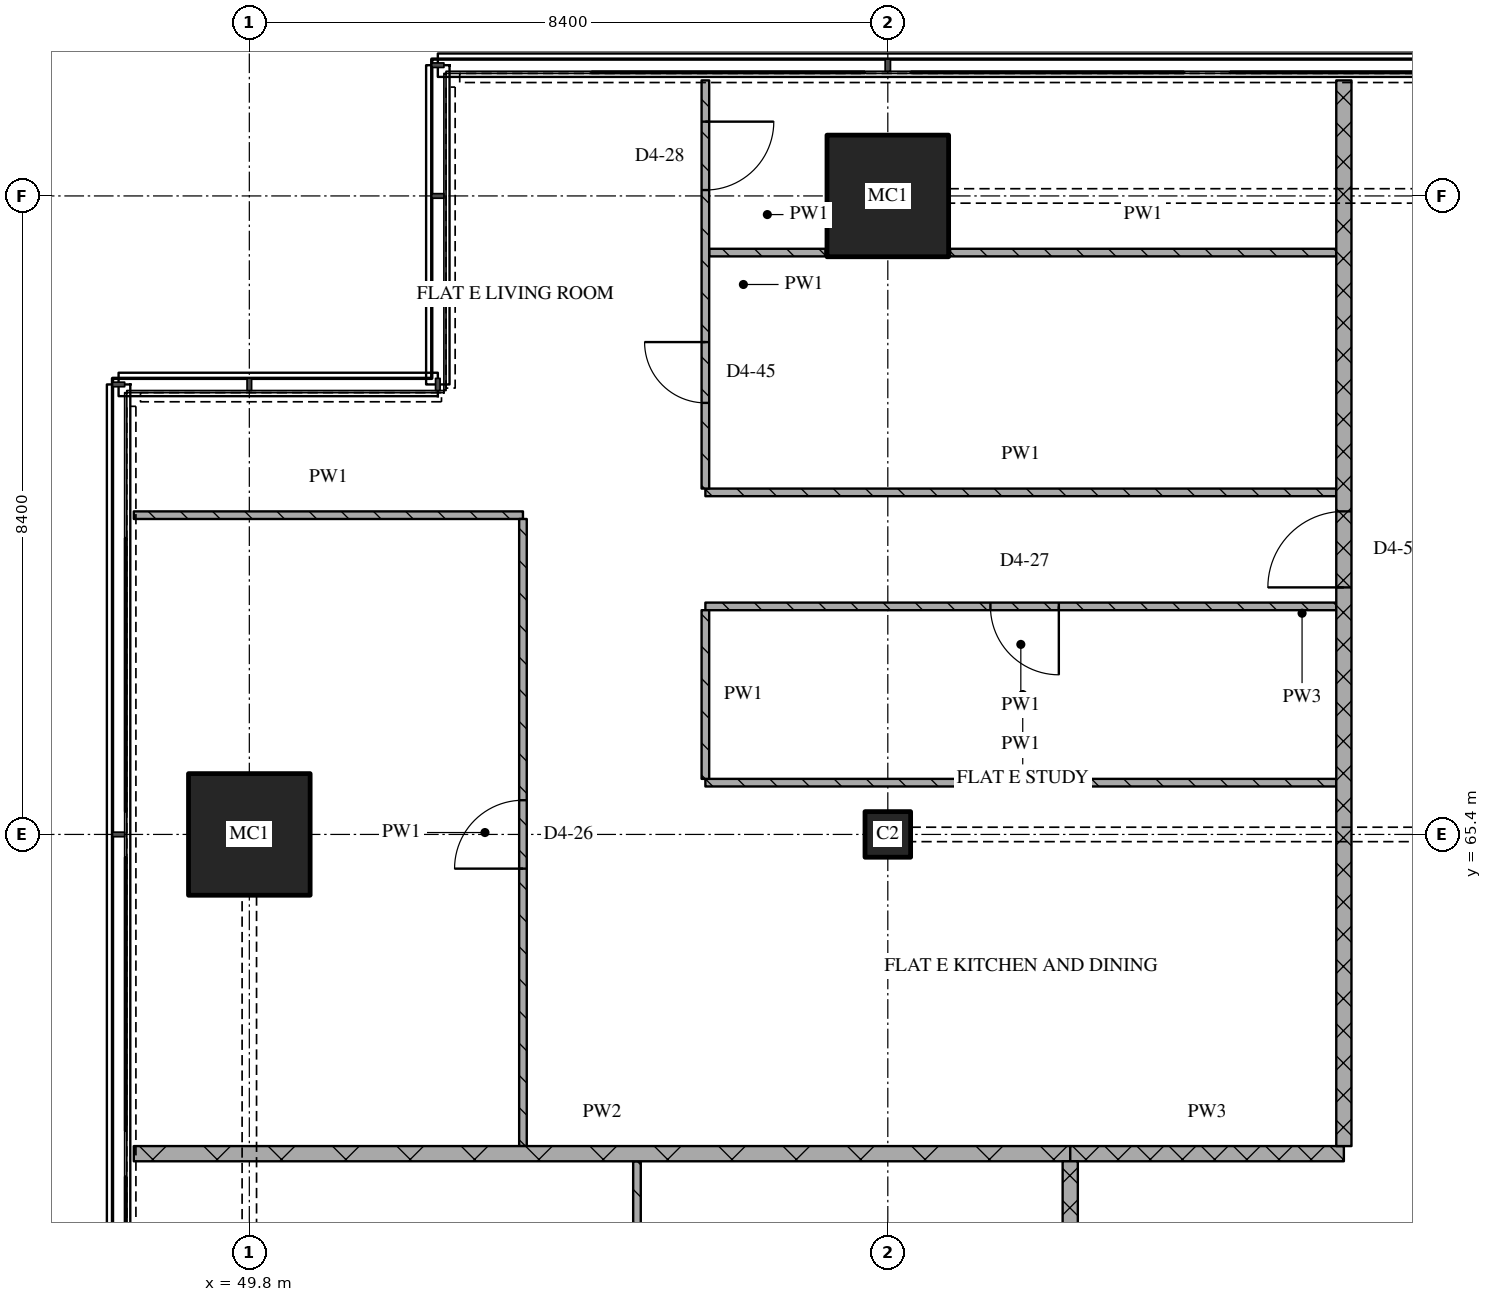
"""IFC4 building model, lengths in metres.
Left out: names, types, materials, properties, quantities, classifications, styles, units other than length and angle.
Written with IfcOpenShell. Run it as: python <this file> out.ifc"""

import sys

from ifc_helpers import new_model, si_unit, direction, frame, frame_2d, origin, origin_2d, place, context, subcontext, project, spatial, rectangle, extrude, element, fill, save


model = new_model("IFC4")
c1 = context("Model", 3, precision=1e-05, world=origin(), true_north=direction((0.0, 1.0)))
c2 = subcontext(c1, "Body", "Model", "MODEL_VIEW")
j1 = project(units=[si_unit("LENGTHUNIT", "METRE"), si_unit("PLANEANGLEUNIT", "RADIAN")], contexts=[c1])
p1 = place(None, origin())
s1 = spatial("IfcSite", under=j1, at=p1, CompositionType="ELEMENT")
p2 = place(p1, origin())
s2 = spatial("IfcBuilding", under=s1, at=p2, CompositionType="ELEMENT")
p3 = place(p2, frame((0.0, 0.0, 241.5)))
s3 = spatial("IfcBuildingStorey", under=s2, at=p3, CompositionType="ELEMENT", Elevation=241.5)
p4 = place(p3, frame((49.8, 65.4, 0.0), z_axis=(0.0, 0.0, 1.0), x_axis=(1.0, 0.0, 0.0)))
e1 = element("IfcColumn", 1, at=p4, inside=s3, PredefinedType="COLUMN", context=c2, shape_type="SweptSolid", body=[
    extrude(rectangle(XDim=1.6, YDim=1.6, at=origin_2d()), origin(), (0.0, 0.0, 1.0), 3.6),
])
p5 = place(p3, frame((58.2, 65.4, 0.0), z_axis=(0.0, 0.0, 1.0), x_axis=(1.0, 0.0, 0.0)))
e2 = element("IfcColumn", 2, at=p5, inside=s3, PredefinedType="COLUMN", context=c2, shape_type="SweptSolid", body=[
    extrude(rectangle(XDim=0.6, YDim=0.6, at=origin_2d()), origin(), (0.0, 0.0, 1.0), 3.6),
])
p6 = place(p3, frame((58.2, 73.8, 0.0), z_axis=(0.0, 0.0, 1.0), x_axis=(1.0, 0.0, 0.0)))
e3 = element("IfcColumn", 3, at=p6, inside=s3, PredefinedType="COLUMN", context=c2, shape_type="SweptSolid", body=[
    extrude(rectangle(XDim=1.6, YDim=1.6, at=origin_2d()), origin(), (0.0, 0.0, 1.0), 3.6),
])
p7 = place(p3, frame((60.6, 61.2, 0.0), z_axis=(0.0, 0.0, 1.0), x_axis=(1.0, 0.0, 0.0)))
e4 = element("IfcWall", 4, at=p7, inside=s3, PredefinedType="PARTITIONING", context=c2, shape_type="SweptSolid", body=[
    extrude(rectangle(XDim=3.6, YDim=0.2, at=frame_2d((1.8, 0.0))), origin(), (0.0, 0.0, 1.0), 3.32),
])
p8 = place(p3, frame((48.28, 61.2, 0.0), z_axis=(0.0, 0.0, 1.0), x_axis=(1.0, 0.0, 0.0)))
e5 = element("IfcWall", 5, at=p8, inside=s3, PredefinedType="PARTITIONING", context=c2, shape_type="SweptSolid", body=[
    extrude(rectangle(XDim=12.32, YDim=0.2, at=frame_2d((6.16, 0.0))), origin(), (0.0, 0.0, 1.0), 3.32),
])
p9 = place(p3, frame((55.8, 66.081, 0.0), z_axis=(0.0, 0.0, 1.0), x_axis=(1.0, 0.0, 0.0)))
e6 = element("IfcWall", 6, at=p9, inside=s3, PredefinedType="PARTITIONING", context=c2, shape_type="SweptSolid", body=[
    extrude(rectangle(XDim=8.3, YDim=0.1, at=frame_2d((4.15, 0.0))), origin(), (0.0, 0.0, 1.0), 3.32),
])
p10 = place(p3, frame((64.1, 68.4, 0.0), z_axis=(0.0, 0.0, 1.0), x_axis=(-1.0, 0.0, 0.0)))
e7 = element("IfcWall", 7, at=p10, inside=s3, PredefinedType="PARTITIONING", context=c2, shape_type="SweptSolid", body=[
    extrude(rectangle(XDim=8.3, YDim=0.1, at=frame_2d((4.15, 0.0))), origin(), (0.0, 0.0, 1.0), 3.32),
])
p11 = place(p10, frame((3.65, 0.0, 0.0)))
e8 = element("IfcOpeningElement", 8, at=p11, cuts=e7, PredefinedType="OPENING", context=c2, shape_type="SweptSolid", body=[
    extrude(rectangle(XDim=0.9, YDim=2.1, at=frame_2d((0.45, 1.05))), frame((0.0, 0.06, 0.0), z_axis=(0.0, -1.0, 0.0), x_axis=(1.0, 0.0, 0.0)), (0.0, 0.0, 1.0), 0.12),
])
p12 = place(p3, frame((48.28, 69.6, 0.0), z_axis=(0.0, 0.0, 1.0), x_axis=(1.0, 0.0, 0.0)))
e9 = element("IfcWall", 9, at=p12, inside=s3, PredefinedType="PARTITIONING", context=c2, shape_type="SweptSolid", body=[
    extrude(rectangle(XDim=5.12, YDim=0.1, at=frame_2d((2.56, 0.0))), origin(), (0.0, 0.0, 1.0), 3.32),
])
p13 = place(p3, frame((55.8, 69.9, 0.0), z_axis=(0.0, 0.0, 1.0), x_axis=(1.0, 0.0, 0.0)))
e10 = element("IfcWall", 10, at=p13, inside=s3, PredefinedType="PARTITIONING", context=c2, shape_type="SweptSolid", body=[
    extrude(rectangle(XDim=8.3, YDim=0.1, at=frame_2d((4.15, 0.0))), origin(), (0.0, 0.0, 1.0), 3.32),
])
p14 = place(p3, frame((55.85, 73.055, 0.0), z_axis=(0.0, 0.0, 1.0), x_axis=(1.0, 0.0, 0.0)))
e11 = element("IfcWall", 11, at=p14, inside=s3, PredefinedType="PARTITIONING", context=c2, shape_type="SweptSolid", body=[
    extrude(rectangle(XDim=1.53, YDim=0.1, at=frame_2d((0.765, 0.0))), origin(), (0.0, 0.0, 1.0), 3.32),
])
p15 = place(p3, frame((59.02, 73.055, 0.0), z_axis=(0.0, 0.0, 1.0), x_axis=(1.0, 0.0, 0.0)))
e12 = element("IfcWall", 12, at=p15, inside=s3, PredefinedType="PARTITIONING", context=c2, shape_type="SweptSolid", body=[
    extrude(rectangle(XDim=5.08, YDim=0.1, at=frame_2d((2.54, 0.0))), origin(), (0.0, 0.0, 1.0), 3.32),
])
p16 = place(p3, frame((53.4, 61.3, 0.0), z_axis=(0.0, 0.0, 1.0), x_axis=(0.0, 1.0, 0.0)))
e13 = element("IfcWall", 13, at=p16, inside=s3, PredefinedType="PARTITIONING", context=c2, shape_type="SweptSolid", body=[
    extrude(rectangle(XDim=8.25, YDim=0.1, at=frame_2d((4.125, 0.0))), origin(), (0.0, 0.0, 1.0), 3.32),
])
p17 = place(p16, frame((3.65, 0.0, 0.0)))
e14 = element("IfcOpeningElement", 14, at=p17, cuts=e13, PredefinedType="OPENING", context=c2, shape_type="SweptSolid", body=[
    extrude(rectangle(XDim=0.9, YDim=2.1, at=frame_2d((0.45, 1.05))), frame((0.0, 0.06, 0.0), z_axis=(0.0, -1.0, 0.0), x_axis=(1.0, 0.0, 0.0)), (0.0, 0.0, 1.0), 0.12),
])
p18 = place(p3, frame((54.9, 61.1, 0.0), z_axis=(0.0, 0.0, 1.0), x_axis=(0.0, -1.0, 0.0)))
e15 = element("IfcWall", 15, at=p18, inside=s3, PredefinedType="PARTITIONING", context=c2, shape_type="SweptSolid", body=[
    extrude(rectangle(XDim=7.65, YDim=0.1, at=frame_2d((3.825, 0.0))), origin(), (0.0, 0.0, 1.0), 3.32),
])
p19 = place(p18, frame((1.15, 0.0, 0.0)))
e16 = element("IfcOpeningElement", 16, at=p19, cuts=e15, PredefinedType="OPENING", context=c2, shape_type="SweptSolid", body=[
    extrude(rectangle(XDim=0.8, YDim=2.1, at=frame_2d((0.4, 1.05))), frame((0.0, 0.06, 0.0), z_axis=(0.0, -1.0, 0.0), x_axis=(1.0, 0.0, 0.0)), (0.0, 0.0, 1.0), 0.12),
])
p20 = place(p18, frame((5.05, 0.0, 0.0)))
e17 = element("IfcOpeningElement", 17, at=p20, cuts=e15, PredefinedType="OPENING", context=c2, shape_type="SweptSolid", body=[
    extrude(rectangle(XDim=0.8, YDim=2.1, at=frame_2d((0.4, 1.05))), frame((0.0, 0.06, 0.0), z_axis=(0.0, -1.0, 0.0), x_axis=(1.0, 0.0, 0.0)), (0.0, 0.0, 1.0), 0.12),
])
p21 = place(p3, frame((55.8, 68.35, 0.0), z_axis=(0.0, 0.0, 1.0), x_axis=(0.0, -1.0, 0.0)))
e18 = element("IfcWall", 18, at=p21, inside=s3, PredefinedType="PARTITIONING", context=c2, shape_type="SweptSolid", body=[
    extrude(rectangle(XDim=2.219, YDim=0.1, at=frame_2d((1.109, 0.0))), origin(), (0.0, 0.0, 1.0), 3.32),
])
p22 = place(p3, frame((55.8, 75.32, 0.0), z_axis=(0.0, 0.0, 1.0), x_axis=(0.0, -1.0, 0.0)))
e19 = element("IfcWall", 19, at=p22, inside=s3, PredefinedType="PARTITIONING", context=c2, shape_type="SweptSolid", body=[
    extrude(rectangle(XDim=5.37, YDim=0.1, at=frame_2d((2.685, 0.0))), origin(), (0.0, 0.0, 1.0), 3.32),
])
p23 = place(p22, frame((0.542, 0.0, 0.0)))
e20 = element("IfcOpeningElement", 20, at=p23, cuts=e19, PredefinedType="OPENING", context=c2, shape_type="SweptSolid", body=[
    extrude(rectangle(XDim=0.9, YDim=2.1, at=frame_2d((0.45, 1.05))), frame((0.0, 0.06, 0.0), z_axis=(0.0, -1.0, 0.0), x_axis=(1.0, 0.0, 0.0)), (0.0, 0.0, 1.0), 0.12),
])
p24 = place(p22, frame((3.443, 0.0, 0.0)))
e21 = element("IfcOpeningElement", 21, at=p24, cuts=e19, PredefinedType="OPENING", context=c2, shape_type="SweptSolid", body=[
    extrude(rectangle(XDim=0.8, YDim=2.1, at=frame_2d((0.4, 1.05))), frame((0.0, 0.06, 0.0), z_axis=(0.0, -1.0, 0.0), x_axis=(1.0, 0.0, 0.0)), (0.0, 0.0, 1.0), 0.12),
])
p25 = place(p3, frame((60.6, 43.3, 0.0), z_axis=(0.0, 0.0, 1.0), x_axis=(0.0, 1.0, 0.0)))
e22 = element("IfcWall", 22, at=p25, inside=s3, PredefinedType="PARTITIONING", context=c2, shape_type="SweptSolid", body=[
    extrude(rectangle(XDim=17.8, YDim=0.2, at=frame_2d((8.9, 0.0))), origin(), (0.0, 0.0, 1.0), 3.32),
])
p26 = place(p25, frame((8.85, 0.0, 0.0)))
e23 = element("IfcOpeningElement", 23, at=p26, cuts=e22, PredefinedType="OPENING", context=c2, shape_type="SweptSolid", body=[
    extrude(rectangle(XDim=1.0, YDim=2.1, at=frame_2d((0.5, 1.05))), frame((0.0, 0.11, 0.0), z_axis=(0.0, -1.0, 0.0), x_axis=(1.0, 0.0, 0.0)), (0.0, 0.0, 1.0), 0.22),
])
p27 = place(p3, frame((64.2, 61.3, 0.0), z_axis=(0.0, 0.0, 1.0), x_axis=(0.0, 1.0, 0.0)))
e24 = element("IfcWall", 24, at=p27, inside=s3, PredefinedType="PARTITIONING", context=c2, shape_type="SweptSolid", body=[
    extrude(rectangle(XDim=14.02, YDim=0.2, at=frame_2d((7.01, 0.0))), origin(), (0.0, 0.0, 1.0), 3.32),
])
p28 = place(p27, frame((7.35, 0.0, 0.0)))
e25 = element("IfcOpeningElement", 25, at=p28, cuts=e24, PredefinedType="OPENING", context=c2, shape_type="SweptSolid", body=[
    extrude(rectangle(XDim=1.0, YDim=2.1, at=frame_2d((0.5, 1.05))), frame((0.0, 0.11, 0.0), z_axis=(0.0, -1.0, 0.0), x_axis=(1.0, 0.0, 0.0)), (0.0, 0.0, 1.0), 0.22),
])
p29 = place(p11, origin())
e26 = element("IfcDoor", 26, at=p29, inside=s3, OperationType="SINGLE_SWING_LEFT", PredefinedType="DOOR", context=c2, shape_type="SweptSolid", body=[
    extrude(rectangle(XDim=0.9, YDim=2.1, at=frame_2d((0.45, 1.05))), frame((0.0, 0.025, 0.0), z_axis=(0.0, -1.0, 0.0), x_axis=(1.0, 0.0, 0.0)), (0.0, 0.0, 1.0), 0.05),
])
fill(e8, e26)
p30 = place(p17, origin())
e27 = element("IfcDoor", 27, at=p30, inside=s3, OperationType="SINGLE_SWING_LEFT", PredefinedType="DOOR", context=c2, shape_type="SweptSolid", body=[
    extrude(rectangle(XDim=0.9, YDim=2.1, at=frame_2d((0.45, 1.05))), frame((0.0, 0.025, 0.0), z_axis=(0.0, -1.0, 0.0), x_axis=(1.0, 0.0, 0.0)), (0.0, 0.0, 1.0), 0.05),
])
fill(e14, e27)
p31 = place(p23, origin())
e28 = element("IfcDoor", 28, at=p31, inside=s3, OperationType="SINGLE_SWING_LEFT", PredefinedType="DOOR", context=c2, shape_type="SweptSolid", body=[
    extrude(rectangle(XDim=0.9, YDim=2.1, at=frame_2d((0.45, 1.05))), frame((0.0, 0.025, 0.0), z_axis=(0.0, -1.0, 0.0), x_axis=(1.0, 0.0, 0.0)), (0.0, 0.0, 1.0), 0.05),
])
fill(e20, e28)
p32 = place(p24, origin())
e29 = element("IfcDoor", 29, at=p32, inside=s3, OperationType="SINGLE_SWING_RIGHT", PredefinedType="DOOR", context=c2, shape_type="SweptSolid", body=[
    extrude(rectangle(XDim=0.8, YDim=2.1, at=frame_2d((0.4, 1.05))), frame((0.0, 0.025, 0.0), z_axis=(0.0, -1.0, 0.0), x_axis=(1.0, 0.0, 0.0)), (0.0, 0.0, 1.0), 0.05),
])
fill(e21, e29)
p33 = place(p28, origin())
e30 = element("IfcDoor", 30, at=p33, inside=s3, OperationType="SINGLE_SWING_LEFT", PredefinedType="DOOR", context=c2, shape_type="SweptSolid", body=[
    extrude(rectangle(XDim=1.0, YDim=2.1, at=frame_2d((0.5, 1.05))), frame((0.0, 0.025, 0.0), z_axis=(0.0, -1.0, 0.0), x_axis=(1.0, 0.0, 0.0)), (0.0, 0.0, 1.0), 0.05),
])
fill(e25, e30)
save(model, sys.argv[1])
